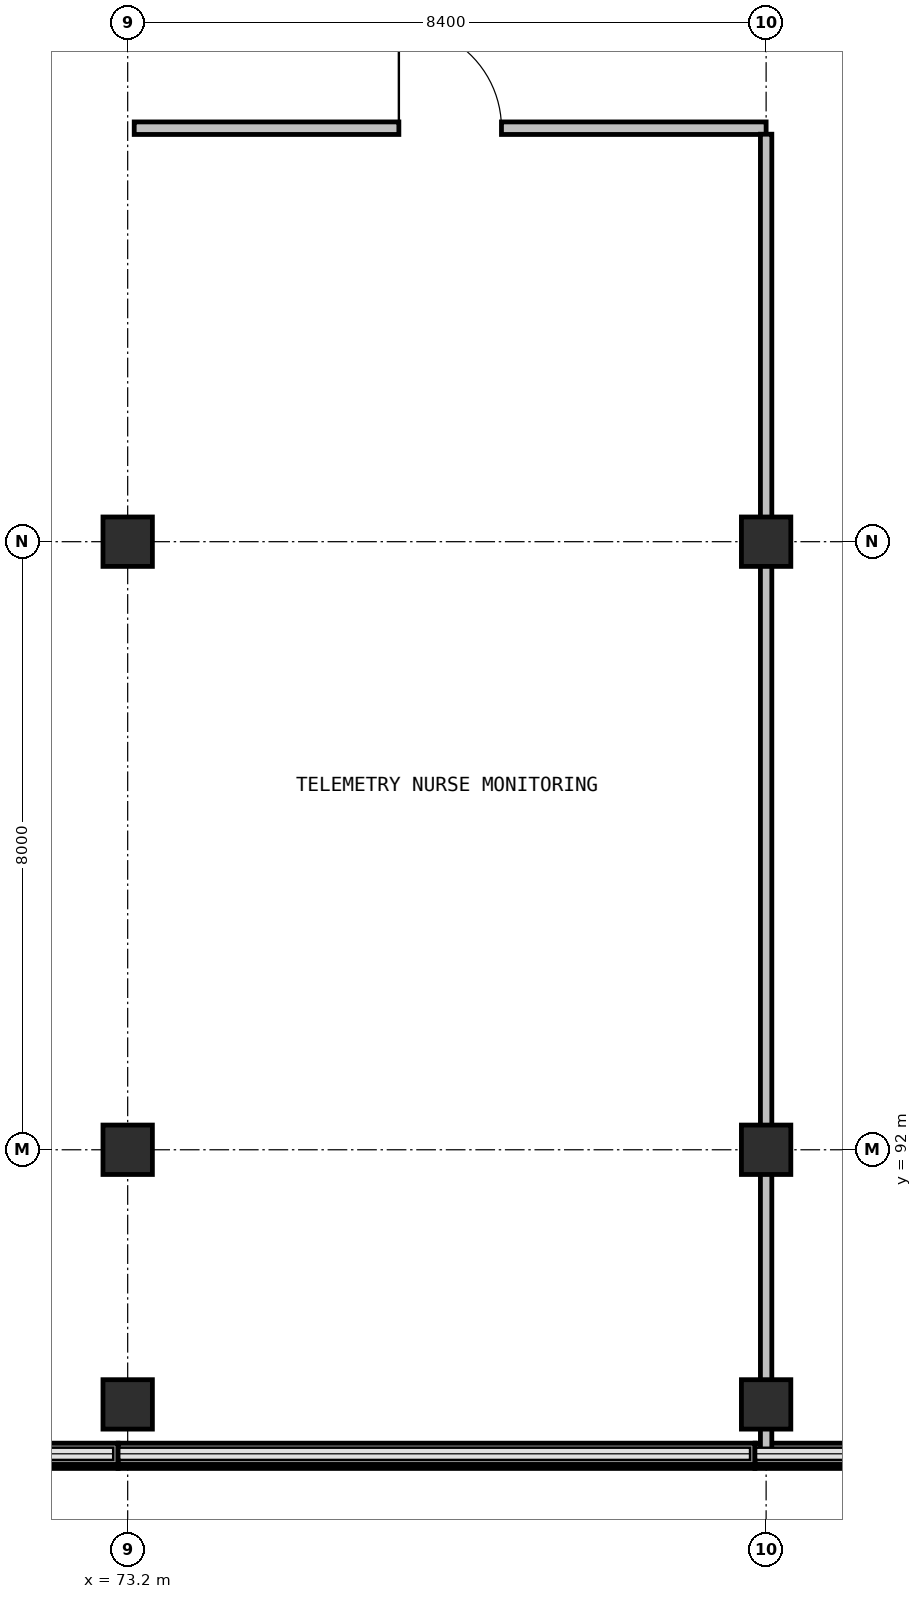
"""IFC4 building model, lengths in metres.
Left out: names, types, materials, properties, quantities, classifications, styles, units other than length and angle.
Written with IfcOpenShell. Run it as: python <this file> out.ifc"""

import sys

from ifc_helpers import new_model, si_unit, direction, frame, frame_2d, origin, origin_2d, place, context, subcontext, project, spatial, rectangle, extrude, element, fill, save


model = new_model("IFC4")
c1 = context("Model", 3, precision=1e-05, world=origin(), true_north=direction((0.0, 1.0)))
c2 = subcontext(c1, "Body", "Model", "MODEL_VIEW")
j1 = project(units=[si_unit("LENGTHUNIT", "METRE"), si_unit("PLANEANGLEUNIT", "RADIAN")], contexts=[c1])
p1 = place(None, origin())
s1 = spatial("IfcSite", under=j1, at=p1, CompositionType="ELEMENT")
p2 = place(p1, origin())
s2 = spatial("IfcBuilding", under=s1, at=p2, CompositionType="ELEMENT")
p3 = place(p2, frame((0.0, 0.0, 27.3)))
s3 = spatial("IfcBuildingStorey", under=s2, at=p3, CompositionType="ELEMENT", Elevation=27.3)
for number, where, z_axis, x_axis in (
    (1, (73.2, 88.65, 0.0), (0.0, 0.0, 1.0), (1.0, 0.0, 0.0)),
    (2, (73.2, 92.0, 0.0), (0.0, 0.0, 1.0), (1.0, 0.0, 0.0)),
    (3, (73.2, 100.0, 0.0), (0.0, 0.0, 1.0), (1.0, 0.0, 0.0)),
    (4, (81.6, 88.65, 0.0), (0.0, 0.0, 1.0), (1.0, 0.0, 0.0)),
    (5, (81.6, 92.0, 0.0), (0.0, 0.0, 1.0), (1.0, 0.0, 0.0)),
    (6, (81.6, 100.0, 0.0), (0.0, 0.0, 1.0), (1.0, 0.0, 0.0)),
):
    element("IfcColumn", number, at=place(p3, frame(where, z_axis=z_axis, x_axis=x_axis)), inside=s3, PredefinedType="COLUMN", context=c2, shape_type="SweptSolid", body=[
        extrude(rectangle(XDim=0.65, YDim=0.65, at=origin_2d()), origin(), (0.0, 0.0, 1.0), 4.05),
    ])
for number, where, z_axis, x_axis in (
    (7, (89.83, 88.0, 0.0), (0.0, 0.0, 1.0), (-1.0, 0.0, 0.0)),
    (8, (81.451, 88.0, 0.0), (0.0, 0.0, 1.0), (-1.0, 0.0, 0.0)),
    (9, (73.072, 88.0, 0.0), (0.0, 0.0, 1.0), (-1.0, 0.0, 0.0)),
):
    element("IfcWall", number, at=place(p3, frame(where, z_axis=z_axis, x_axis=x_axis)), inside=s3, PredefinedType="SOLIDWALL", context=c2, shape_type="SweptSolid", body=[
        extrude(rectangle(XDim=8.375, YDim=0.28, at=frame_2d((4.188, 0.0))), origin(), (0.0, 0.0, 1.0), 0.94),
    ])
p4 = place(p3, frame((73.286, 105.44, 0.0), z_axis=(0.0, 0.0, 1.0), x_axis=(1.0, 0.0, 0.0)))
e10 = element("IfcWall", 10, at=p4, inside=s3, PredefinedType="PARTITIONING", context=c2, shape_type="SweptSolid", body=[
    extrude(rectangle(XDim=8.314, YDim=0.165, at=frame_2d((4.157, 0.0))), origin(), (0.0, 0.0, 1.0), 3.13),
])
p5 = place(p4, frame((3.482, 0.0, 0.0)))
e11 = element("IfcOpeningElement", 11, at=p5, cuts=e10, PredefinedType="OPENING", context=c2, shape_type="SweptSolid", body=[
    extrude(rectangle(XDim=1.35, YDim=2.15, at=frame_2d((0.675, 1.075))), frame((0.0, 0.093, 0.0), z_axis=(0.0, -1.0, 0.0), x_axis=(1.0, 0.0, 0.0)), (0.0, 0.0, 1.0), 0.185),
])
p6 = place(p3, frame((81.6, 105.361, 0.0), z_axis=(0.0, 0.0, 1.0), x_axis=(0.0, -1.0, 0.0)))
e12 = element("IfcWall", 12, at=p6, inside=s3, PredefinedType="PARTITIONING", context=c2, shape_type="SweptSolid", body=[
    extrude(rectangle(XDim=17.319, YDim=0.15, at=frame_2d((8.66, 0.0))), origin(), (0.0, 0.0, 1.0), 3.18),
])
p7 = place(p5, origin())
e13 = element("IfcDoor", 13, at=p7, inside=s3, OperationType="SINGLE_SWING_RIGHT", PredefinedType="DOOR", context=c2, shape_type="SweptSolid", body=[
    extrude(rectangle(XDim=1.35, YDim=2.15, at=frame_2d((0.675, 1.075))), frame((0.0, 0.025, 0.0), z_axis=(0.0, -1.0, 0.0), x_axis=(1.0, 0.0, 0.0)), (0.0, 0.0, 1.0), 0.05),
])
fill(e11, e13)
save(model, sys.argv[1])
